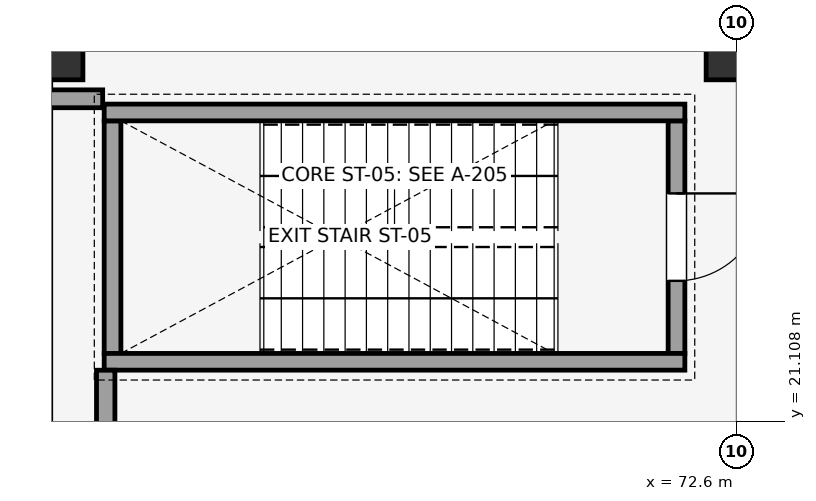
"""IFC4 building model, lengths in metres.
Left out: names, types, materials, properties, quantities, classifications, styles, units other than length and angle.
Written with IfcOpenShell. Run it as: python <this file> out.ifc"""

import sys

from ifc_helpers import new_model, si_unit, direction, frame, frame_2d, origin, origin_2d, place, context, subcontext, project, spatial, rectangle, extrude, element, fill, save


model = new_model("IFC4")
c1 = context("Model", 3, precision=1e-05, world=origin(), true_north=direction((0.0, 1.0)))
c2 = subcontext(c1, "Body", "Model", "MODEL_VIEW")
j1 = project(units=[si_unit("LENGTHUNIT", "METRE"), si_unit("PLANEANGLEUNIT", "RADIAN")], contexts=[c1])
p1 = place(None, origin())
s1 = spatial("IfcSite", under=j1, at=p1, CompositionType="ELEMENT")
p2 = place(p1, origin())
s2 = spatial("IfcBuilding", under=s1, at=p2, CompositionType="ELEMENT")
p3 = place(p2, origin())
s3 = spatial("IfcBuildingStorey", under=s2, at=p3, CompositionType="ELEMENT", Elevation=0.0)
for number, where, z_axis, x_axis in (
    (1, (63.6, 26.0, 0.0), (0.0, 0.0, 1.0), (1.0, 0.0, 0.0)),
    (2, (72.6, 26.0, 0.0), (0.0, 0.0, 1.0), (1.0, 0.0, 0.0)),
):
    element("IfcColumn", number, at=place(p3, frame(where, z_axis=z_axis, x_axis=x_axis)), inside=s3, PredefinedType="COLUMN", context=c2, shape_type="SweptSolid", body=[
        extrude(rectangle(XDim=0.8, YDim=0.8, at=origin_2d()), origin(), (0.0, 0.0, 1.0), 4.5),
    ])
p4 = place(p3, frame((71.81, 25.06, 0.0), z_axis=(0.0, 0.0, 1.0), x_axis=(0.0, -1.0, 0.0)))
e3 = element("IfcWall", 3, at=p4, inside=s3, PredefinedType="SHEAR", context=c2, shape_type="SweptSolid", body=[
    extrude(rectangle(XDim=3.06, YDim=0.22, at=frame_2d((1.53, 0.0))), origin(), (0.0, 0.0, 1.0), 4.5),
])
p5 = place(p4, frame((0.955, 0.0, 0.0)))
e4 = element("IfcOpeningElement", 4, at=p5, cuts=e3, PredefinedType="OPENING", context=c2, shape_type="SweptSolid", body=[
    extrude(rectangle(XDim=1.15, YDim=2.15, at=frame_2d((0.575, 1.075))), frame((0.0, 0.12, 0.0), z_axis=(0.0, -1.0, 0.0), x_axis=(1.0, 0.0, 0.0)), (0.0, 0.0, 1.0), 0.24),
])
p6 = place(p3, frame((64.39, 25.06, 0.0), z_axis=(0.0, 0.0, 1.0), x_axis=(0.0, -1.0, 0.0)))
e5 = element("IfcWall", 5, at=p6, inside=s3, PredefinedType="SHEAR", context=c2, shape_type="SweptSolid", body=[
    extrude(rectangle(XDim=3.06, YDim=0.22, at=frame_2d((1.53, 0.0))), origin(), (0.0, 0.0, 1.0), 4.5),
])
for number, where, z_axis, x_axis in (
    (6, (71.92, 25.17, 0.0), (0.0, 0.0, 1.0), (-1.0, 0.0, 0.0)),
    (7, (71.92, 21.89, 0.0), (0.0, 0.0, 1.0), (-1.0, 0.0, 0.0)),
):
    element("IfcWall", number, at=place(p3, frame(where, z_axis=z_axis, x_axis=x_axis)), inside=s3, PredefinedType="SHEAR", context=c2, shape_type="SweptSolid", body=[
        extrude(rectangle(XDim=7.64, YDim=0.22, at=frame_2d((3.82, 0.0))), origin(), (0.0, 0.0, 1.0), 4.5),
    ])
p7 = place(p3, frame((61.401, 25.35, 0.0), z_axis=(0.0, 0.0, 1.0), x_axis=(1.0, 0.0, 0.0)))
e8 = element("IfcWall", 8, at=p7, inside=s3, PredefinedType="PARTITIONING", context=c2, shape_type="SweptSolid", body=[
    extrude(rectangle(XDim=2.859, YDim=0.235, at=frame_2d((1.43, 0.0))), origin(), (0.0, 0.0, 1.0), 2.7),
])
p8 = place(p3, frame((64.3, 21.779, 0.0), z_axis=(0.0, 0.0, 1.0), x_axis=(0.0, -1.0, 0.0)))
e9 = element("IfcWall", 9, at=p8, inside=s3, PredefinedType="SOLIDWALL", context=c2, shape_type="SweptSolid", body=[
    extrude(rectangle(XDim=3.779, YDim=0.242, at=frame_2d((1.89, 0.0))), origin(), (0.0, 0.0, 1.0), 2.7),
])
p9 = place(p5, origin())
e10 = element("IfcDoor", 10, at=p9, inside=s3, OperationType="SINGLE_SWING_LEFT", PredefinedType="DOOR", context=c2, shape_type="SweptSolid", body=[
    extrude(rectangle(XDim=1.15, YDim=2.15, at=frame_2d((0.575, 1.075))), frame((0.0, 0.025, 0.0), z_axis=(0.0, -1.0, 0.0), x_axis=(1.0, 0.0, 0.0)), (0.0, 0.0, 1.0), 0.05),
])
fill(e4, e10)
save(model, sys.argv[1])
